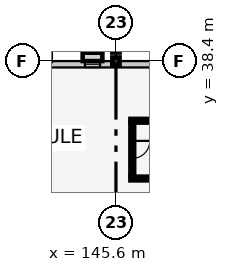
"""IFC4 building model, lengths in metres.
Left out: names, types, materials, properties, quantities, classifications, styles, units other than length and angle.
Written with IfcOpenShell. Run it as: python <this file> out.ifc"""

import sys

from ifc_helpers import new_model, si_unit, direction, frame, frame_2d, origin, origin_2d, place, context, subcontext, project, spatial, rectangle, extrude, element, fill, save


model = new_model("IFC4")
c1 = context("Model", 3, precision=1e-05, world=origin(), true_north=direction((0.0, 1.0)))
c2 = subcontext(c1, "Body", "Model", "MODEL_VIEW")
j1 = project(units=[si_unit("LENGTHUNIT", "METRE"), si_unit("PLANEANGLEUNIT", "RADIAN")], contexts=[c1])
p1 = place(None, origin())
s1 = spatial("IfcSite", under=j1, at=p1, CompositionType="ELEMENT")
p2 = place(p1, origin())
s2 = spatial("IfcBuilding", under=s1, at=p2, CompositionType="ELEMENT")
p3 = place(p2, frame((0.0, 0.0, 9.6)))
s3 = spatial("IfcBuildingStorey", under=s2, at=p3, CompositionType="ELEMENT", Elevation=9.6)
for number, where, z_axis, x_axis in (
    (1, (145.6, 38.4, 0.0), (0.0, 0.0, 1.0), (1.0, 0.0, 0.0)),
    (2, (145.6, 39.2, 0.0), (0.0, 0.0, 1.0), (1.0, 0.0, 0.0)),
):
    element("IfcColumn", number, at=place(p3, frame(where, z_axis=z_axis, x_axis=x_axis)), inside=s3, PredefinedType="COLUMN", context=c2, shape_type="SweptSolid", body=[
        extrude(rectangle(XDim=0.48, YDim=0.48, at=origin_2d()), origin(), (0.0, 0.0, 1.0), 4.2),
    ])
p4 = place(p3, frame((124.0, 38.19, 0.0), z_axis=(0.0, 0.0, 1.0), x_axis=(1.0, 0.0, 0.0)))
e3 = element("IfcWall", 3, at=p4, inside=s3, PredefinedType="SOLIDWALL", context=c2, shape_type="SweptSolid", body=[
    extrude(rectangle(XDim=62.0, YDim=0.42, at=frame_2d((31.0, 0.0))), origin(), (0.0, 0.0, 1.0), 3.675),
])
p5 = place(p4, frame((1.299, 0.0, 0.9)))
e4 = element("IfcOpeningElement", 4, at=p5, cuts=e3, PredefinedType="OPENING", context=c2, shape_type="SweptSolid", body=[
    extrude(rectangle(XDim=1.05, YDim=1.6, at=frame_2d((0.525, 0.8))), frame((0.0, 0.222, 0.0), z_axis=(0.0, -1.0, 0.0), x_axis=(1.0, 0.0, 0.0)), (0.0, 0.0, 1.0), 0.444),
])
p6 = place(p4, frame((4.896, 0.0, 0.9)))
e5 = element("IfcOpeningElement", 5, at=p6, cuts=e3, PredefinedType="OPENING", context=c2, shape_type="SweptSolid", body=[
    extrude(rectangle(XDim=1.15, YDim=1.6, at=frame_2d((0.575, 0.8))), frame((0.0, 0.222, 0.0), z_axis=(0.0, -1.0, 0.0), x_axis=(1.0, 0.0, 0.0)), (0.0, 0.0, 1.0), 0.444),
])
p7 = place(p4, frame((8.493, 0.0, 0.9)))
e6 = element("IfcOpeningElement", 6, at=p7, cuts=e3, PredefinedType="OPENING", context=c2, shape_type="SweptSolid", body=[
    extrude(rectangle(XDim=1.25, YDim=1.6, at=frame_2d((0.625, 0.8))), frame((0.0, 0.222, 0.0), z_axis=(0.0, -1.0, 0.0), x_axis=(1.0, 0.0, 0.0)), (0.0, 0.0, 1.0), 0.444),
])
p8 = place(p4, frame((12.075, 0.0, 0.9)))
e7 = element("IfcOpeningElement", 7, at=p8, cuts=e3, PredefinedType="OPENING", context=c2, shape_type="SweptSolid", body=[
    extrude(rectangle(XDim=1.38, YDim=1.6, at=frame_2d((0.69, 0.8))), frame((0.0, 0.222, 0.0), z_axis=(0.0, -1.0, 0.0), x_axis=(1.0, 0.0, 0.0)), (0.0, 0.0, 1.0), 0.444),
])
p9 = place(p4, frame((15.662, 0.0, 0.9)))
e8 = element("IfcOpeningElement", 8, at=p9, cuts=e3, PredefinedType="OPENING", context=c2, shape_type="SweptSolid", body=[
    extrude(rectangle(XDim=1.5, YDim=1.6, at=frame_2d((0.75, 0.8))), frame((0.0, 0.222, 0.0), z_axis=(0.0, -1.0, 0.0), x_axis=(1.0, 0.0, 0.0)), (0.0, 0.0, 1.0), 0.444),
])
p10 = place(p4, frame((19.559, 0.0, 0.9)))
e9 = element("IfcOpeningElement", 9, at=p10, cuts=e3, PredefinedType="OPENING", context=c2, shape_type="SweptSolid", body=[
    extrude(rectangle(XDim=1.0, YDim=1.75, at=frame_2d((0.5, 0.875))), frame((0.0, 0.222, 0.0), z_axis=(0.0, -1.0, 0.0), x_axis=(1.0, 0.0, 0.0)), (0.0, 0.0, 1.0), 0.444),
])
p11 = place(p4, frame((26.733, 0.0, 0.9)))
e10 = element("IfcOpeningElement", 10, at=p11, cuts=e3, PredefinedType="OPENING", context=c2, shape_type="SweptSolid", body=[
    extrude(rectangle(XDim=1.24, YDim=1.75, at=frame_2d((0.62, 0.875))), frame((0.0, 0.222, 0.0), z_axis=(0.0, -1.0, 0.0), x_axis=(1.0, 0.0, 0.0)), (0.0, 0.0, 1.0), 0.444),
])
p12 = place(p4, frame((37.544, 0.0, 0.9)))
e11 = element("IfcOpeningElement", 11, at=p12, cuts=e3, PredefinedType="OPENING", context=c2, shape_type="SweptSolid", body=[
    extrude(rectangle(XDim=1.5, YDim=1.75, at=frame_2d((0.75, 0.875))), frame((0.0, 0.222, 0.0), z_axis=(0.0, -1.0, 0.0), x_axis=(1.0, 0.0, 0.0)), (0.0, 0.0, 1.0), 0.444),
])
p13 = place(p4, frame((48.685, 0.0, 0.9)))
e12 = element("IfcOpeningElement", 12, at=p13, cuts=e3, PredefinedType="OPENING", context=c2, shape_type="SweptSolid", body=[
    extrude(rectangle(XDim=1.1, YDim=1.35, at=frame_2d((0.55, 0.675))), frame((0.0, 0.222, 0.0), z_axis=(0.0, -1.0, 0.0), x_axis=(1.0, 0.0, 0.0)), (0.0, 0.0, 1.0), 0.444),
])
p14 = place(p4, frame((59.477, 0.0, 0.9)))
e13 = element("IfcOpeningElement", 13, at=p14, cuts=e3, PredefinedType="OPENING", context=c2, shape_type="SweptSolid", body=[
    extrude(rectangle(XDim=1.4, YDim=1.35, at=frame_2d((0.7, 0.675))), frame((0.0, 0.222, 0.0), z_axis=(0.0, -1.0, 0.0), x_axis=(1.0, 0.0, 0.0)), (0.0, 0.0, 1.0), 0.444),
])
for number, where, z_axis, x_axis in (
    (14, (146.55, 30.675, 0.0), (0.0, 0.0, 1.0), (1.0, 0.0, 0.0)),
    (15, (155.45, 34.475, 0.0), (0.0, 0.0, 1.0), (-1.0, 0.0, 0.0)),
):
    element("IfcWall", number, at=place(p3, frame(where, z_axis=z_axis, x_axis=x_axis)), inside=s3, PredefinedType="SHEAR", context=c2, shape_type="SweptSolid", body=[
        extrude(rectangle(XDim=8.9, YDim=0.25, at=frame_2d((4.45, 0.0))), origin(), (0.0, 0.0, 1.0), 3.95),
    ])
p15 = place(p3, frame((146.675, 34.35, 0.0), z_axis=(0.0, 0.0, 1.0), x_axis=(0.0, -1.0, 0.0)))
e16 = element("IfcWall", 16, at=p15, inside=s3, PredefinedType="SHEAR", context=c2, shape_type="SweptSolid", body=[
    extrude(rectangle(XDim=3.55, YDim=0.25, at=frame_2d((1.775, 0.0))), origin(), (0.0, 0.0, 1.0), 3.95),
])
p16 = place(p15, frame((1.2, 0.0, 0.0)))
e17 = element("IfcOpeningElement", 17, at=p16, cuts=e16, PredefinedType="OPENING", context=c2, shape_type="SweptSolid", body=[
    extrude(rectangle(XDim=1.15, YDim=2.15, at=frame_2d((0.575, 1.075))), frame((0.0, 0.137, 0.0), z_axis=(0.0, -1.0, 0.0), x_axis=(1.0, 0.0, 0.0)), (0.0, 0.0, 1.0), 0.274),
])
p17 = place(p10, origin())
e18 = element("IfcWindow", 18, at=p17, inside=s3, PartitioningType="SINGLE_PANEL", PredefinedType="WINDOW", context=c2, shape_type="SweptSolid", body=[
    extrude(rectangle(XDim=1.0, YDim=1.75, at=frame_2d((0.5, 0.875))), frame((0.0, 0.03, 0.0), z_axis=(0.0, -1.0, 0.0), x_axis=(1.0, 0.0, 0.0)), (0.0, 0.0, 1.0), 0.06),
])
fill(e9, e18)
p18 = place(p16, origin())
e19 = element("IfcDoor", 19, at=p18, inside=s3, OperationType="SINGLE_SWING_LEFT", PredefinedType="DOOR", context=c2, shape_type="SweptSolid", body=[
    extrude(rectangle(XDim=1.15, YDim=2.15, at=frame_2d((0.575, 1.075))), frame((0.0, 0.025, 0.0), z_axis=(0.0, -1.0, 0.0), x_axis=(1.0, 0.0, 0.0)), (0.0, 0.0, 1.0), 0.05),
])
fill(e17, e19)
save(model, sys.argv[1])
